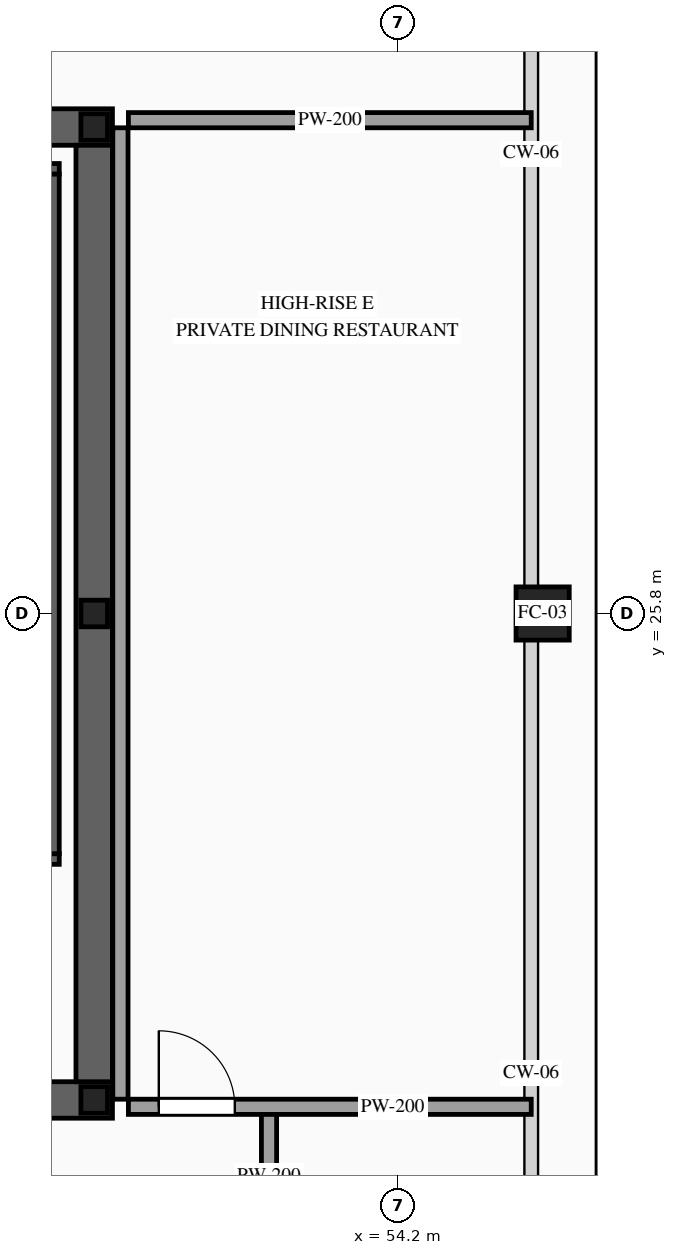
"""IFC4 building model, lengths in metres.
Left out: names, types, materials, properties, quantities, classifications, styles, units other than length and angle.
Written with IfcOpenShell. Run it as: python <this file> out.ifc"""

import sys

from ifc_helpers import new_model, si_unit, direction, frame, frame_2d, origin, origin_2d, place, context, subcontext, project, spatial, rectangle, hollow_rectangle, i_section, extrude, source, transform, mapped, element, fill, save


model = new_model("IFC4")
c1 = context("Model", 3, precision=1e-05, world=origin(), true_north=direction((0.0, 1.0)))
c2 = subcontext(c1, "Body", "Model", "MODEL_VIEW")
j1 = project(units=[si_unit("LENGTHUNIT", "METRE"), si_unit("PLANEANGLEUNIT", "RADIAN")], contexts=[c1])
p1 = place(None, origin())
s1 = spatial("IfcSite", under=j1, at=p1, CompositionType="ELEMENT")
p2 = place(p1, origin())
s2 = spatial("IfcBuilding", under=s1, at=p2, CompositionType="ELEMENT")
p3 = place(p2, frame((0.0, 0.0, 347.2)))
s3 = spatial("IfcBuildingStorey", under=s2, at=p3, CompositionType="ELEMENT", Elevation=347.2)
p4 = place(p3, frame((23.56, 19.4, 0.0), z_axis=(0.0, 0.0, 1.0), x_axis=(1.0, 0.0, 0.0)))
e1 = element("IfcWall", 1, at=p4, inside=s3, PredefinedType="SHEAR", context=c2, shape_type="SweptSolid", body=[
    extrude(rectangle(XDim=26.88, YDim=0.48, at=frame_2d((13.44, 0.0))), origin(), (0.0, 0.0, 1.0), 4.0),
])
p5 = place(p4, frame((1.89, 0.0, 0.0)))
e2 = element("IfcOpeningElement", 2, at=p5, cuts=e1, PredefinedType="OPENING", context=c2, shape_type="SweptSolid", body=[
    extrude(rectangle(XDim=1.1, YDim=2.2, at=frame_2d((0.55, 1.1))), frame((0.0, 0.255, 0.0), z_axis=(0.0, -1.0, 0.0), x_axis=(1.0, 0.0, 0.0)), (0.0, 0.0, 1.0), 0.51),
])
p6 = place(p4, frame((9.79, 0.0, 0.0)))
e3 = element("IfcOpeningElement", 3, at=p6, cuts=e1, PredefinedType="OPENING", context=c2, shape_type="SweptSolid", body=[
    extrude(rectangle(XDim=1.1, YDim=2.2, at=frame_2d((0.55, 1.1))), frame((0.0, 0.255, 0.0), z_axis=(0.0, -1.0, 0.0), x_axis=(1.0, 0.0, 0.0)), (0.0, 0.0, 1.0), 0.51),
])
p7 = place(p4, frame((22.99, 0.0, 0.0)))
e4 = element("IfcOpeningElement", 4, at=p7, cuts=e1, PredefinedType="OPENING", context=c2, shape_type="SweptSolid", body=[
    extrude(rectangle(XDim=1.1, YDim=2.2, at=frame_2d((0.55, 1.1))), frame((0.0, 0.255, 0.0), z_axis=(0.0, -1.0, 0.0), x_axis=(1.0, 0.0, 0.0)), (0.0, 0.0, 1.0), 0.51),
])
p8 = place(p4, frame((19.61, 0.0, 0.0)))
e5 = element("IfcOpeningElement", 5, at=p8, cuts=e1, PredefinedType="OPENING", context=c2, shape_type="SweptSolid", body=[
    extrude(rectangle(XDim=0.9, YDim=2.15, at=frame_2d((0.45, 1.075))), frame((0.0, 0.255, 0.0), z_axis=(0.0, -1.0, 0.0), x_axis=(1.0, 0.0, 0.0)), (0.0, 0.0, 1.0), 0.51),
])
p9 = place(p4, frame((18.17, 0.0, 0.0)))
e6 = element("IfcOpeningElement", 6, at=p9, cuts=e1, PredefinedType="OPENING", context=c2, shape_type="SweptSolid", body=[
    extrude(rectangle(XDim=0.9, YDim=2.15, at=frame_2d((0.45, 1.075))), frame((0.0, 0.255, 0.0), z_axis=(0.0, -1.0, 0.0), x_axis=(1.0, 0.0, 0.0)), (0.0, 0.0, 1.0), 0.51),
])
p10 = place(p3, frame((23.56, 32.2, 0.0), z_axis=(0.0, 0.0, 1.0), x_axis=(1.0, 0.0, 0.0)))
e7 = element("IfcWall", 7, at=p10, inside=s3, PredefinedType="SHEAR", context=c2, shape_type="SweptSolid", body=[
    extrude(rectangle(XDim=26.88, YDim=0.48, at=frame_2d((13.44, 0.0))), origin(), (0.0, 0.0, 1.0), 4.0),
])
p11 = place(p10, frame((4.51, 0.0, 0.0)))
e8 = element("IfcOpeningElement", 8, at=p11, cuts=e7, PredefinedType="OPENING", context=c2, shape_type="SweptSolid", body=[
    extrude(rectangle(XDim=0.9, YDim=2.15, at=frame_2d((0.45, 1.075))), frame((0.0, 0.255, 0.0), z_axis=(0.0, -1.0, 0.0), x_axis=(1.0, 0.0, 0.0)), (0.0, 0.0, 1.0), 0.51),
])
p12 = place(p10, frame((9.79, 0.0, 0.0)))
e9 = element("IfcOpeningElement", 9, at=p12, cuts=e7, PredefinedType="OPENING", context=c2, shape_type="SweptSolid", body=[
    extrude(rectangle(XDim=1.1, YDim=2.2, at=frame_2d((0.55, 1.1))), frame((0.0, 0.255, 0.0), z_axis=(0.0, -1.0, 0.0), x_axis=(1.0, 0.0, 0.0)), (0.0, 0.0, 1.0), 0.51),
])
p13 = place(p10, frame((15.64, 0.0, 0.0)))
e10 = element("IfcOpeningElement", 10, at=p13, cuts=e7, PredefinedType="OPENING", context=c2, shape_type="SweptSolid", body=[
    extrude(rectangle(XDim=1.1, YDim=2.2, at=frame_2d((0.55, 1.1))), frame((0.0, 0.255, 0.0), z_axis=(0.0, -1.0, 0.0), x_axis=(1.0, 0.0, 0.0)), (0.0, 0.0, 1.0), 0.51),
])
p14 = place(p10, frame((18.74, 0.0, 0.0)))
e11 = element("IfcOpeningElement", 11, at=p14, cuts=e7, PredefinedType="OPENING", context=c2, shape_type="SweptSolid", body=[
    extrude(rectangle(XDim=1.1, YDim=2.2, at=frame_2d((0.55, 1.1))), frame((0.0, 0.255, 0.0), z_axis=(0.0, -1.0, 0.0), x_axis=(1.0, 0.0, 0.0)), (0.0, 0.0, 1.0), 0.51),
])
m1 = source(origin(), c2, "Body", "SweptSolid", [
    extrude(rectangle(XDim=12.32, YDim=0.48, at=frame_2d((6.16, 0.0))), origin(), (0.0, 0.0, 1.0), 4.0),
])
p15 = place(p3, frame((50.2, 19.64, 0.0), z_axis=(0.0, 0.0, 1.0), x_axis=(0.0, 1.0, 0.0)))
e12 = element("IfcWall", 12, at=p15, inside=s3, PredefinedType="SHEAR", context=c2, shape_type="MappedRepresentation", body=[
    mapped(m1, transform((0.0, 0.0, 0.0), scale=1.0)),
])
m2 = source(origin(), c2, "Body", "SweptSolid", [
    extrude(i_section(OverallWidth=0.35, OverallDepth=0.35, WebThickness=0.012, FlangeThickness=0.019, at=origin_2d()), origin(), (0.0, 0.0, 1.0), 4.0),
])
for number, where, z_axis, x_axis in (
    (13, (50.2, 19.4, 0.0), (0.0, 0.0, 1.0), (1.0, 0.0, 0.0)),
    (14, (50.2, 25.8, 0.0), (0.0, 0.0, 1.0), (1.0, 0.0, 0.0)),
    (15, (50.2, 32.2, 0.0), (0.0, 0.0, 1.0), (1.0, 0.0, 0.0)),
):
    element("IfcColumn", number, at=place(p3, frame(where, z_axis=z_axis, x_axis=x_axis)), inside=s3, PredefinedType="COLUMN", context=c2, shape_type="MappedRepresentation", body=[
        mapped(m2, transform((0.0, 0.0, 0.0), scale=1.0)),
    ])
m3 = source(origin(), c2, "Body", "SweptSolid", [
    extrude(hollow_rectangle(XDim=0.7, YDim=0.7, WallThickness=0.032, at=origin_2d()), origin(), (0.0, 0.0, 1.0), 4.0),
])
p16 = place(p3, frame((56.1, 25.8, 0.0), z_axis=(0.0, 0.0, 1.0), x_axis=(1.0, 0.0, 0.0)))
e16 = element("IfcColumn", 16, at=p16, inside=s3, PredefinedType="COLUMN", context=c2, shape_type="MappedRepresentation", body=[
    mapped(m3, transform((0.0, 0.0, 0.0), scale=1.0)),
])
p17 = place(p3, frame((46.46, 22.57, 0.0), z_axis=(0.0, 0.0, 1.0), x_axis=(1.0, 0.0, 0.0)))
e17 = element("IfcWall", 17, at=p17, inside=s3, PredefinedType="SOLIDWALL", context=c2, shape_type="SweptSolid", body=[
    extrude(rectangle(XDim=3.28, YDim=0.14, at=frame_2d((1.64, 0.0))), origin(), (0.0, 0.0, 1.0), 3.7),
])
p18 = place(p17, frame((1.09, 0.0, 0.0)))
e18 = element("IfcOpeningElement", 18, at=p18, cuts=e17, PredefinedType="OPENING", context=c2, shape_type="SweptSolid", body=[
    extrude(rectangle(XDim=1.1, YDim=2.2, at=frame_2d((0.55, 1.1))), frame((0.0, 0.085, 0.0), z_axis=(0.0, -1.0, 0.0), x_axis=(1.0, 0.0, 0.0)), (0.0, 0.0, 1.0), 0.17),
])
m4 = source(origin(), c2, "Body", "SweptSolid", [
    extrude(rectangle(XDim=3.28, YDim=0.14, at=frame_2d((1.64, 0.0))), origin(), (0.0, 0.0, 1.0), 3.7),
])
p19 = place(p3, frame((46.46, 31.65, 0.0), z_axis=(0.0, 0.0, 1.0), x_axis=(1.0, 0.0, 0.0)))
e19 = element("IfcWall", 19, at=p19, inside=s3, PredefinedType="SOLIDWALL", context=c2, shape_type="MappedRepresentation", body=[
    mapped(m4, transform((0.0, 0.0, 0.0), scale=1.0)),
])
m5 = source(origin(), c2, "Body", "SweptSolid", [
    extrude(rectangle(XDim=8.94, YDim=0.14, at=frame_2d((4.47, 0.0))), origin(), (0.0, 0.0, 1.0), 3.7),
])
p20 = place(p3, frame((49.67, 22.64, 0.0), z_axis=(0.0, 0.0, 1.0), x_axis=(0.0, 1.0, 0.0)))
e20 = element("IfcWall", 20, at=p20, inside=s3, PredefinedType="SOLIDWALL", context=c2, shape_type="MappedRepresentation", body=[
    mapped(m5, transform((0.0, 0.0, 0.0), scale=1.0)),
])
m6 = source(origin(), c2, "Body", "SweptSolid", [
    extrude(rectangle(XDim=1.7, YDim=0.2, at=frame_2d((0.85, 0.0))), origin(), (0.0, 0.0, 1.0), 3.7),
])
p21 = place(p3, frame((52.5, 17.55, 0.0), z_axis=(0.0, 0.0, 1.0), x_axis=(0.0, 1.0, 0.0)))
e21 = element("IfcWall", 21, at=p21, inside=s3, PredefinedType="PARTITIONING", context=c2, shape_type="MappedRepresentation", body=[
    mapped(m6, transform((0.0, 0.0, 0.0), scale=1.0)),
])
p22 = place(p3, frame((50.65, 19.31, 0.0), z_axis=(0.0, 0.0, 1.0), x_axis=(1.0, 0.0, 0.0)))
e22 = element("IfcWall", 22, at=p22, inside=s3, PredefinedType="PARTITIONING", context=c2, shape_type="SweptSolid", body=[
    extrude(rectangle(XDim=5.3, YDim=0.2, at=frame_2d((2.65, 0.0))), origin(), (0.0, 0.0, 1.0), 3.245),
])
p23 = place(p22, frame((0.4, 0.0, 0.0)))
e23 = element("IfcOpeningElement", 23, at=p23, cuts=e22, PredefinedType="OPENING", context=c2, shape_type="SweptSolid", body=[
    extrude(rectangle(XDim=1.0, YDim=2.2, at=frame_2d((0.5, 1.1))), frame((0.0, 0.115, 0.0), z_axis=(0.0, -1.0, 0.0), x_axis=(1.0, 0.0, 0.0)), (0.0, 0.0, 1.0), 0.23),
])
m7 = source(origin(), c2, "Body", "SweptSolid", [
    extrude(rectangle(XDim=5.3, YDim=0.2, at=frame_2d((2.65, 0.0))), origin(), (0.0, 0.0, 1.0), 3.245),
])
p24 = place(p3, frame((50.65, 32.29, 0.0), z_axis=(0.0, 0.0, 1.0), x_axis=(1.0, 0.0, 0.0)))
e24 = element("IfcWall", 24, at=p24, inside=s3, PredefinedType="PARTITIONING", context=c2, shape_type="MappedRepresentation", body=[
    mapped(m7, transform((0.0, 0.0, 0.0), scale=1.0)),
])
m8 = source(origin(), c2, "Body", "SweptSolid", [
    extrude(rectangle(XDim=12.78, YDim=0.2, at=frame_2d((6.39, 0.0))), origin(), (0.0, 0.0, 1.0), 3.7),
])
p25 = place(p3, frame((50.545, 19.41, 0.0), z_axis=(0.0, 0.0, 1.0), x_axis=(0.0, 1.0, 0.0)))
e25 = element("IfcWall", 25, at=p25, inside=s3, PredefinedType="PARTITIONING", context=c2, shape_type="MappedRepresentation", body=[
    mapped(m8, transform((0.0, 0.0, 0.0), scale=1.0)),
])
m9 = source(origin(), c2, "Body", "SweptSolid", [
    extrude(rectangle(XDim=1.0, YDim=2.2, at=frame_2d((0.5, 1.1))), frame((0.0, 0.025, 0.0), z_axis=(0.0, -1.0, 0.0), x_axis=(1.0, 0.0, 0.0)), (0.0, 0.0, 1.0), 0.05),
])
p26 = place(p23, origin())
e26 = element("IfcDoor", 26, at=p26, inside=s3, OperationType="SINGLE_SWING_LEFT", PredefinedType="DOOR", context=c2, shape_type="MappedRepresentation", body=[
    mapped(m9, transform((0.0, 0.0, 0.0), scale=1.0)),
])
fill(e23, e26)
save(model, sys.argv[1])
